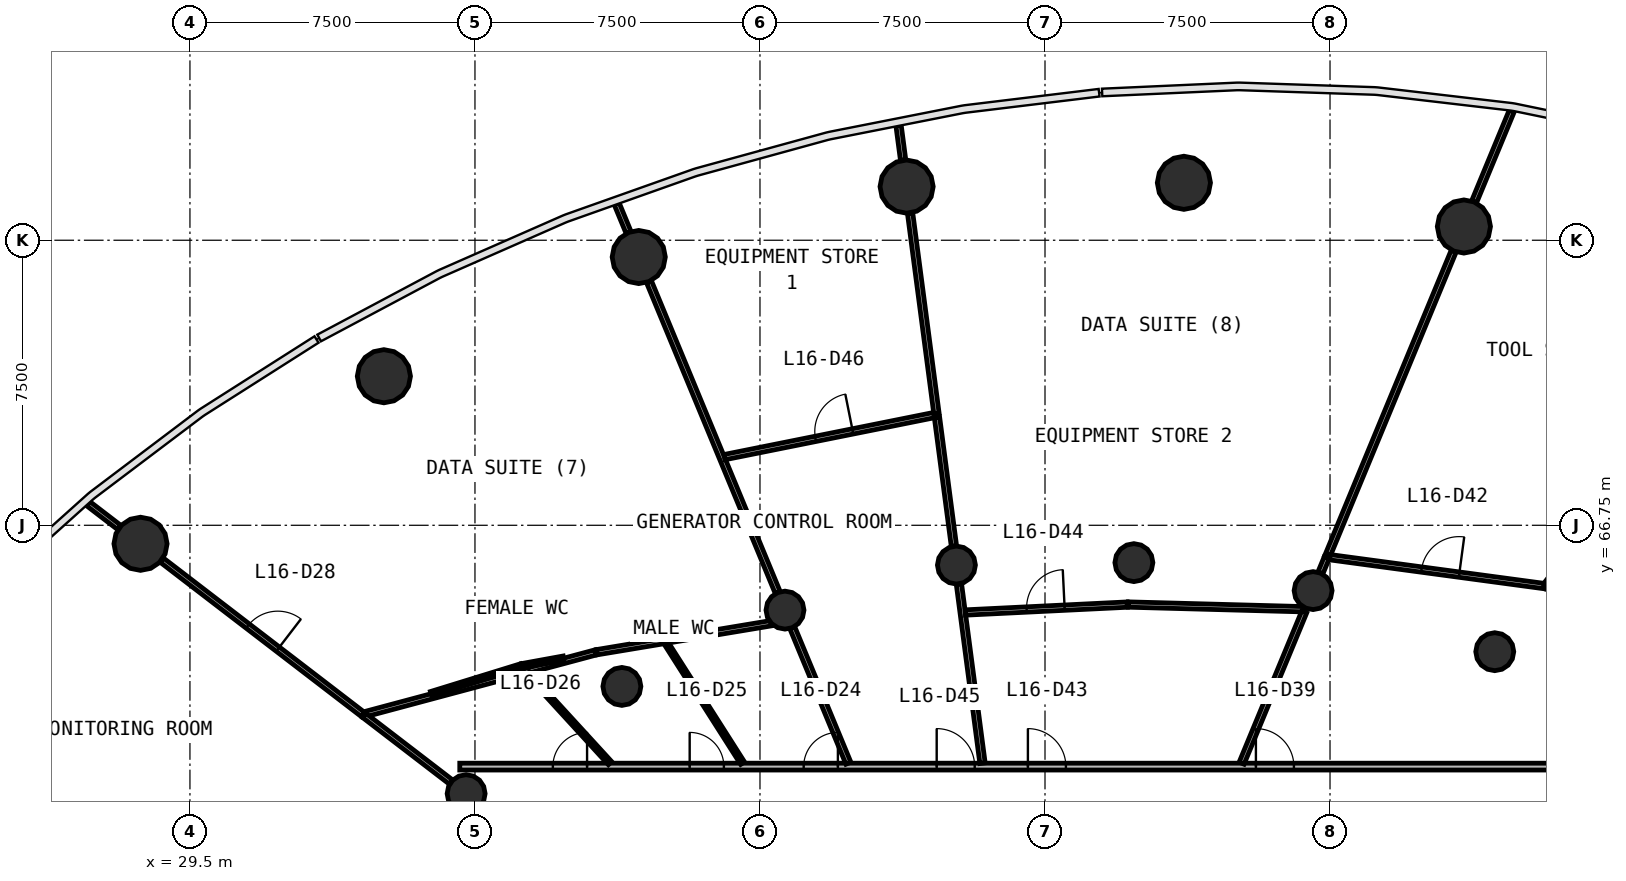
"""IFC4 building model, lengths in metres.
Left out: names, types, materials, properties, quantities, classifications, styles, units other than length and angle.
Written with IfcOpenShell. Run it as: python <this file> out.ifc"""

import sys

from ifc_helpers import new_model, si_unit, direction, frame, frame_2d, origin, origin_2d, place, context, subcontext, project, spatial, rectangle, circle, extrude, source, transform, mapped, element, fill, save


model = new_model("IFC4")
c1 = context("Model", 3, precision=1e-05, world=origin(), true_north=direction((0.0, 1.0)))
c2 = subcontext(c1, "Body", "Model", "MODEL_VIEW")
j1 = project(units=[si_unit("LENGTHUNIT", "METRE"), si_unit("PLANEANGLEUNIT", "RADIAN")], contexts=[c1])
p1 = place(None, origin())
s1 = spatial("IfcSite", under=j1, at=p1, CompositionType="ELEMENT")
p2 = place(p1, origin())
s2 = spatial("IfcBuilding", under=s1, at=p2, CompositionType="ELEMENT")
p3 = place(p2, frame((0.0, 0.0, 71.0)))
s3 = spatial("IfcBuildingStorey", under=s2, at=p3, CompositionType="ELEMENT", Elevation=71.0)
m1 = source(origin(), c2, "Body", "SweptSolid", [
    extrude(circle(Radius=0.7, at=origin_2d()), origin(), (0.0, 0.0, 1.0), 4.4),
])
for number, where, z_axis, x_axis in (
    (1, (63.023, 74.611, 0.0), (0.0, 0.0, 1.0), (1.0, 0.0, 0.0)),
    (2, (55.655, 75.761, 0.0), (0.0, 0.0, 1.0), (1.0, 0.0, 0.0)),
    (3, (48.358, 75.661, 0.0), (0.0, 0.0, 1.0), (1.0, 0.0, 0.0)),
    (4, (41.31, 73.809, 0.0), (0.0, 0.0, 1.0), (1.0, 0.0, 0.0)),
    (5, (34.604, 70.672, 0.0), (0.0, 0.0, 1.0), (1.0, 0.0, 0.0)),
    (6, (28.199, 66.263, 0.0), (0.0, 0.0, 1.0), (1.0, 0.0, 0.0)),
):
    element("IfcColumn", number, at=place(p3, frame(where, z_axis=z_axis, x_axis=x_axis)), inside=s3, PredefinedType="COLUMN", context=c2, shape_type="MappedRepresentation", body=[
        mapped(m1, transform((0.0, 0.0, 0.0), scale=1.0)),
    ])
m2 = source(origin(), c2, "Body", "SweptSolid", [
    extrude(circle(Radius=0.5, at=origin_2d()), origin(), (0.0, 0.0, 1.0), 4.4),
])
for number, where, z_axis, x_axis in (
    (7, (63.835, 63.424, 0.0), (0.0, 0.0, 1.0), (1.0, 0.0, 0.0)),
    (8, (59.055, 65.031, 0.0), (0.0, 0.0, 1.0), (1.0, 0.0, 0.0)),
    (9, (54.339, 65.767, 0.0), (0.0, 0.0, 1.0), (1.0, 0.0, 0.0)),
    (10, (49.669, 65.703, 0.0), (0.0, 0.0, 1.0), (1.0, 0.0, 0.0)),
    (11, (45.158, 64.518, 0.0), (0.0, 0.0, 1.0), (1.0, 0.0, 0.0)),
    (12, (40.866, 62.51, 0.0), (0.0, 0.0, 1.0), (1.0, 0.0, 0.0)),
    (13, (36.768, 59.688, 0.0), (0.0, 0.0, 1.0), (1.0, 0.0, 0.0)),
):
    element("IfcColumn", number, at=place(p3, frame(where, z_axis=z_axis, x_axis=x_axis)), inside=s3, PredefinedType="COLUMN", context=c2, shape_type="MappedRepresentation", body=[
        mapped(m2, transform((0.0, 0.0, 0.0), scale=1.0)),
    ])
p4 = place(p3, frame((36.6, 60.4, 0.0), z_axis=(0.0, 0.0, 1.0), x_axis=(1.0, 0.0, 0.0)))
e14 = element("IfcWall", 14, at=p4, inside=s3, PredefinedType="PARTITIONING", context=c2, shape_type="SweptSolid", body=[
    extrude(rectangle(XDim=30.8, YDim=0.18, at=frame_2d((15.4, 0.0))), origin(), (0.0, 0.0, 1.0), 3.0),
])
p5 = place(p4, frame((9.05, 0.0, 0.0)))
e15 = element("IfcOpeningElement", 15, at=p5, cuts=e14, PredefinedType="OPENING", context=c2, shape_type="SweptSolid", body=[
    extrude(rectangle(XDim=0.9, YDim=2.1, at=frame_2d((0.45, 1.05))), frame((0.0, 0.1, 0.0), z_axis=(0.0, -1.0, 0.0), x_axis=(1.0, 0.0, 0.0)), (0.0, 0.0, 1.0), 0.2),
])
p6 = place(p4, frame((6.05, 0.0, 0.0)))
e16 = element("IfcOpeningElement", 16, at=p6, cuts=e14, PredefinedType="OPENING", context=c2, shape_type="SweptSolid", body=[
    extrude(rectangle(XDim=0.9, YDim=2.1, at=frame_2d((0.45, 1.05))), frame((0.0, 0.1, 0.0), z_axis=(0.0, -1.0, 0.0), x_axis=(1.0, 0.0, 0.0)), (0.0, 0.0, 1.0), 0.2),
])
p7 = place(p4, frame((2.45, 0.0, 0.0)))
e17 = element("IfcOpeningElement", 17, at=p7, cuts=e14, PredefinedType="OPENING", context=c2, shape_type="SweptSolid", body=[
    extrude(rectangle(XDim=0.9, YDim=2.1, at=frame_2d((0.45, 1.05))), frame((0.0, 0.1, 0.0), z_axis=(0.0, -1.0, 0.0), x_axis=(1.0, 0.0, 0.0)), (0.0, 0.0, 1.0), 0.2),
])
p8 = place(p4, frame((20.95, 0.0, 0.0)))
e18 = element("IfcOpeningElement", 18, at=p8, cuts=e14, PredefinedType="OPENING", context=c2, shape_type="SweptSolid", body=[
    extrude(rectangle(XDim=1.0, YDim=2.1, at=frame_2d((0.5, 1.05))), frame((0.0, 0.1, 0.0), z_axis=(0.0, -1.0, 0.0), x_axis=(1.0, 0.0, 0.0)), (0.0, 0.0, 1.0), 0.2),
])
p9 = place(p4, frame((14.95, 0.0, 0.0)))
e19 = element("IfcOpeningElement", 19, at=p9, cuts=e14, PredefinedType="OPENING", context=c2, shape_type="SweptSolid", body=[
    extrude(rectangle(XDim=1.0, YDim=2.1, at=frame_2d((0.5, 1.05))), frame((0.0, 0.1, 0.0), z_axis=(0.0, -1.0, 0.0), x_axis=(1.0, 0.0, 0.0)), (0.0, 0.0, 1.0), 0.2),
])
p10 = place(p4, frame((12.55, 0.0, 0.0)))
e20 = element("IfcOpeningElement", 20, at=p10, cuts=e14, PredefinedType="OPENING", context=c2, shape_type="SweptSolid", body=[
    extrude(rectangle(XDim=1.0, YDim=2.1, at=frame_2d((0.5, 1.05))), frame((0.0, 0.1, 0.0), z_axis=(0.0, -1.0, 0.0), x_axis=(1.0, 0.0, 0.0)), (0.0, 0.0, 1.0), 0.2),
])
p11 = place(p3, frame((32.561, 56.052, 0.0), z_axis=(0.0, 0.0, 1.0), x_axis=(-0.923874685699, 0.382695133396, 0.0)))
e21 = element("IfcWall", 21, at=p11, inside=s3, PredefinedType="PARTITIONING", context=c2, shape_type="SweptSolid", body=[
    extrude(rectangle(XDim=10.341, YDim=0.14, at=frame_2d((5.17, 0.0))), origin(), (0.0, 0.0, 1.0), 3.0),
])
p12 = place(p3, frame((44.965, 64.984, 0.0), z_axis=(0.0, 0.0, 1.0), x_axis=(-0.382692208588, 0.923875897232, 0.0)))
e22 = element("IfcWall", 22, at=p12, inside=s3, PredefinedType="PARTITIONING", context=c2, shape_type="SweptSolid", body=[
    extrude(rectangle(XDim=8.846, YDim=0.14, at=frame_2d((4.423, 0.0))), origin(), (0.0, 0.0, 1.0), 3.0),
])
p13 = place(p3, frame((59.423, 65.92, 0.0), z_axis=(0.0, 0.0, 1.0), x_axis=(0.382676362581, 0.92388246088, 0.0)))
e23 = element("IfcWall", 23, at=p13, inside=s3, PredefinedType="PARTITIONING", context=c2, shape_type="SweptSolid", body=[
    extrude(rectangle(XDim=8.703, YDim=0.14, at=frame_2d((4.351, 0.0))), origin(), (0.0, 0.0, 1.0), 3.0),
])
p14 = place(p3, frame((65.158, 65.147, 0.0), z_axis=(0.0, 0.0, 1.0), x_axis=(0.608766021213, 0.793349816548, 0.0)))
e24 = element("IfcWall", 24, at=p14, inside=s3, PredefinedType="PARTITIONING", context=c2, shape_type="SweptSolid", body=[
    extrude(rectangle(XDim=8.059, YDim=0.14, at=frame_2d((4.029, 0.0))), origin(), (0.0, 0.0, 1.0), 3.0),
])
p15 = place(p3, frame((65.229, 65.126, 0.0), z_axis=(0.0, 0.0, 1.0), x_axis=(0.95810065558, -0.286431726205, 0.0)))
e25 = element("IfcWall", 25, at=p15, inside=s3, PredefinedType="PARTITIONING", context=c2, shape_type="SweptSolid", body=[
    extrude(rectangle(XDim=6.798, YDim=0.14, at=frame_2d((3.399, 0.0))), origin(), (0.0, 0.0, 1.0), 3.0),
])
p16 = place(p15, frame((2.947, 0.0, 0.0)))
e26 = element("IfcOpeningElement", 26, at=p16, cuts=e25, PredefinedType="OPENING", context=c2, shape_type="SweptSolid", body=[
    extrude(rectangle(XDim=1.0, YDim=2.1, at=frame_2d((0.5, 1.05))), frame((0.0, 0.08, 0.0), z_axis=(0.0, -1.0, 0.0), x_axis=(1.0, 0.0, 0.0)), (0.0, 0.0, 1.0), 0.16),
])
p17 = place(p3, frame((28.758, 65.834, 0.0), z_axis=(0.0, 0.0, 1.0), x_axis=(0.793370473237, -0.608739100268, 0.0)))
e27 = element("IfcWall", 27, at=p17, inside=s3, PredefinedType="PARTITIONING", context=c2, shape_type="SweptSolid", body=[
    extrude(rectangle(XDim=6.682, YDim=0.14, at=frame_2d((3.341, 0.0))), origin(), (0.0, 0.0, 1.0), 3.0),
])
p18 = place(p17, frame((2.85, 0.0, 0.0)))
e28 = element("IfcOpeningElement", 28, at=p18, cuts=e27, PredefinedType="OPENING", context=c2, shape_type="SweptSolid", body=[
    extrude(rectangle(XDim=1.0, YDim=2.1, at=frame_2d((0.5, 1.05))), frame((0.0, 0.08, 0.0), z_axis=(0.0, -1.0, 0.0), x_axis=(1.0, 0.0, 0.0)), (0.0, 0.0, 1.0), 0.16),
])
p19 = place(p3, frame((40.179, 63.406, 0.0), z_axis=(0.0, 0.0, 1.0), x_axis=(-0.965952889726, -0.258718021851, 0.0)))
e29 = element("IfcWall", 29, at=p19, inside=s3, PredefinedType="PARTITIONING", context=c2, shape_type="SweptSolid", body=[
    extrude(rectangle(XDim=6.305, YDim=0.14, at=frame_2d((3.153, 0.0))), origin(), (0.0, 0.0, 1.0), 3.0),
])
p20 = place(p3, frame((59.494, 65.91, 0.0), z_axis=(0.0, 0.0, 1.0), x_axis=(0.991057166824, -0.133437970936, 0.0)))
e30 = element("IfcWall", 30, at=p20, inside=s3, PredefinedType="PARTITIONING", context=c2, shape_type="SweptSolid", body=[
    extrude(rectangle(XDim=5.685, YDim=0.14, at=frame_2d((2.842, 0.0))), origin(), (0.0, 0.0, 1.0), 3.0),
])
p21 = place(p20, frame((2.435, 0.0, 0.0)))
e31 = element("IfcOpeningElement", 31, at=p21, cuts=e30, PredefinedType="OPENING", context=c2, shape_type="SweptSolid", body=[
    extrude(rectangle(XDim=1.0, YDim=2.1, at=frame_2d((0.5, 1.05))), frame((0.0, 0.08, 0.0), z_axis=(0.0, -1.0, 0.0), x_axis=(1.0, 0.0, 0.0)), (0.0, 0.0, 1.0), 0.16),
])
p22 = place(p3, frame((43.566, 68.543, 0.0), z_axis=(0.0, 0.0, 1.0), x_axis=(0.980468350945, 0.196676924916, 0.0)))
e32 = element("IfcWall", 32, at=p22, inside=s3, PredefinedType="PARTITIONING", context=c2, shape_type="SweptSolid", body=[
    extrude(rectangle(XDim=5.693, YDim=0.14, at=frame_2d((2.846, 0.0))), origin(), (0.0, 0.0, 1.0), 3.0),
])
p23 = place(p22, frame((2.443, 0.0, 0.0)))
e33 = element("IfcOpeningElement", 33, at=p23, cuts=e32, PredefinedType="OPENING", context=c2, shape_type="SweptSolid", body=[
    extrude(rectangle(XDim=1.0, YDim=2.1, at=frame_2d((0.5, 1.05))), frame((0.0, 0.08, 0.0), z_axis=(0.0, -1.0, 0.0), x_axis=(1.0, 0.0, 0.0)), (0.0, 0.0, 1.0), 0.16),
])
p24 = place(p3, frame((49.144, 69.692, 0.0), z_axis=(0.0, 0.0, 1.0), x_axis=(-0.130515097822, 0.991446321916, 0.0)))
e34 = element("IfcWall", 34, at=p24, inside=s3, PredefinedType="PARTITIONING", context=c2, shape_type="SweptSolid", body=[
    extrude(rectangle(XDim=5.316, YDim=0.14, at=frame_2d((2.658, 0.0))), origin(), (0.0, 0.0, 1.0), 3.0),
])
p25 = place(p3, frame((49.735, 65.203, 0.0), z_axis=(0.0, 0.0, 1.0), x_axis=(0.130548834981, -0.991441880135, 0.0)))
e35 = element("IfcWall", 35, at=p25, inside=s3, PredefinedType="PARTITIONING", context=c2, shape_type="SweptSolid", body=[
    extrude(rectangle(XDim=4.754, YDim=0.14, at=frame_2d((2.377, 0.0))), origin(), (0.0, 0.0, 1.0), 3.0),
])
p26 = place(p3, frame((44.79, 64.173, 0.0), z_axis=(0.0, 0.0, 1.0), x_axis=(-0.986452107545, -0.164049503258, 0.0)))
e36 = element("IfcWall", 36, at=p26, inside=s3, PredefinedType="PARTITIONING", context=c2, shape_type="SweptSolid", body=[
    extrude(rectangle(XDim=4.645, YDim=0.14, at=frame_2d((2.322, 0.0))), origin(), (0.0, 0.0, 1.0), 3.0),
])
p27 = place(p3, frame((58.851, 64.54, 0.0), z_axis=(0.0, 0.0, 1.0), x_axis=(-0.999641405582, 0.026777980617, 0.0)))
e37 = element("IfcWall", 37, at=p27, inside=s3, PredefinedType="PARTITIONING", context=c2, shape_type="SweptSolid", body=[
    extrude(rectangle(XDim=4.659, YDim=0.14, at=frame_2d((2.33, 0.0))), origin(), (0.0, 0.0, 1.0), 3.0),
])
p28 = place(p3, frame((57.174, 60.49, 0.0), z_axis=(0.0, 0.0, 1.0), x_axis=(0.382647054989, 0.923894599675, 0.0)))
e38 = element("IfcWall", 38, at=p28, inside=s3, PredefinedType="PARTITIONING", context=c2, shape_type="SweptSolid", body=[
    extrude(rectangle(XDim=4.309, YDim=0.14, at=frame_2d((2.154, 0.0))), origin(), (0.0, 0.0, 1.0), 3.0),
])
p29 = place(p3, frame((49.904, 64.455, 0.0), z_axis=(0.0, 0.0, 1.0), x_axis=(0.998809903791, 0.048772698191, 0.0)))
e39 = element("IfcWall", 39, at=p29, inside=s3, PredefinedType="PARTITIONING", context=c2, shape_type="SweptSolid", body=[
    extrude(rectangle(XDim=4.265, YDim=0.14, at=frame_2d((2.132, 0.0))), origin(), (0.0, 0.0, 1.0), 3.0),
])
p30 = place(p29, frame((1.615, 0.0, 0.0)))
e40 = element("IfcOpeningElement", 40, at=p30, cuts=e39, PredefinedType="OPENING", context=c2, shape_type="SweptSolid", body=[
    extrude(rectangle(XDim=1.0, YDim=2.1, at=frame_2d((0.5, 1.05))), frame((0.0, 0.08, 0.0), z_axis=(0.0, -1.0, 0.0), x_axis=(1.0, 0.0, 0.0)), (0.0, 0.0, 1.0), 0.16),
])
p31 = place(p3, frame((46.826, 60.49, 0.0), z_axis=(0.0, 0.0, 1.0), x_axis=(-0.382644558062, 0.923895633817, 0.0)))
e41 = element("IfcWall", 41, at=p31, inside=s3, PredefinedType="PARTITIONING", context=c2, shape_type="SweptSolid", body=[
    extrude(rectangle(XDim=3.854, YDim=0.14, at=frame_2d((1.927, 0.0))), origin(), (0.0, 0.0, 1.0), 3.0),
])
p32 = place(p3, frame((49.604, 66.203, 0.0), z_axis=(0.0, 0.0, 1.0), x_axis=(-0.130526548141, 0.991444814516, 0.0)))
e42 = element("IfcWall", 42, at=p32, inside=s3, PredefinedType="PARTITIONING", context=c2, shape_type="SweptSolid", body=[
    extrude(rectangle(XDim=3.419, YDim=0.14, at=frame_2d((1.709, 0.0))), origin(), (0.0, 0.0, 1.0), 3.0),
])
p33 = place(p3, frame((36.367, 59.995, 0.0), z_axis=(0.0, 0.0, 1.0), x_axis=(-0.793375175499, 0.608732971755, 0.0)))
e43 = element("IfcWall", 43, at=p33, inside=s3, PredefinedType="PARTITIONING", context=c2, shape_type="SweptSolid", body=[
    extrude(rectangle(XDim=2.873, YDim=0.14, at=frame_2d((1.437, 0.0))), origin(), (0.0, 0.0, 1.0), 3.0),
])
p34 = place(p3, frame((63.292, 75.263, 0.0), z_axis=(0.0, 0.0, 1.0), x_axis=(0.382735718693, 0.923857873072, 0.0)))
e44 = element("IfcWall", 44, at=p34, inside=s3, PredefinedType="PARTITIONING", context=c2, shape_type="SweptSolid", body=[
    extrude(rectangle(XDim=2.583, YDim=0.14, at=frame_2d((1.292, 0.0))), origin(), (0.0, 0.0, 1.0), 3.0),
])
p35 = place(p3, frame((27.641, 66.691, 0.0), z_axis=(0.0, 0.0, 1.0), x_axis=(-0.793207707095, 0.608951174895, 0.0)))
e45 = element("IfcWall", 45, at=p35, inside=s3, PredefinedType="PARTITIONING", context=c2, shape_type="SweptSolid", body=[
    extrude(rectangle(XDim=1.026, YDim=0.14, at=frame_2d((0.513, 0.0))), origin(), (0.0, 0.0, 1.0), 3.0),
])
p36 = place(p3, frame((48.266, 76.36, 0.0), z_axis=(0.0, 0.0, 1.0), x_axis=(-0.130495264695, 0.991448932569, 0.0)))
e46 = element("IfcWall", 46, at=p36, inside=s3, PredefinedType="PARTITIONING", context=c2, shape_type="SweptSolid", body=[
    extrude(rectangle(XDim=0.93, YDim=0.14, at=frame_2d((0.465, 0.0))), origin(), (0.0, 0.0, 1.0), 3.0),
])
p37 = place(p3, frame((41.04, 74.46, 0.0), z_axis=(0.0, 0.0, 1.0), x_axis=(-0.382641988431, 0.923896698062, 0.0)))
e47 = element("IfcWall", 47, at=p37, inside=s3, PredefinedType="PARTITIONING", context=c2, shape_type="SweptSolid", body=[
    extrude(rectangle(XDim=0.817, YDim=0.14, at=frame_2d((0.409, 0.0))), origin(), (0.0, 0.0, 1.0), 3.0),
])
p38 = place(p3, frame((59.248, 65.498, 0.0), z_axis=(0.0, 0.0, 1.0), x_axis=(0.382705452121, 0.923870411322, 0.0)))
e48 = element("IfcWall", 48, at=p38, inside=s3, PredefinedType="PARTITIONING", context=c2, shape_type="SweptSolid", body=[
    extrude(rectangle(XDim=0.427, YDim=0.14, at=frame_2d((0.213, 0.0))), origin(), (0.0, 0.0, 1.0), 3.0),
])
p39 = place(p3, frame((38.212, 63.047, 0.0), z_axis=(0.0, 0.0, 1.0), x_axis=(-0.955599721478, -0.294667901731, 0.0)))
e49 = element("IfcWall", 49, at=p39, inside=s3, PredefinedType="PARTITIONING", context=c2, shape_type="SweptSolid", body=[
    extrude(rectangle(XDim=2.476, YDim=0.12, at=frame_2d((1.238, 0.0))), origin(), (0.0, 0.0, 1.0), 3.0),
])
p40 = place(p3, frame((44.043, 60.49, 0.0), z_axis=(0.0, 0.0, 1.0), x_axis=(-0.53728105283, 0.843403266694, 0.0)))
e50 = element("IfcWall", 50, at=p40, inside=s3, PredefinedType="PARTITIONING", context=c2, shape_type="SweptSolid", body=[
    extrude(rectangle(XDim=3.739, YDim=0.12, at=frame_2d((1.869, 0.0))), origin(), (0.0, 0.0, 1.0), 3.0),
])
p41 = place(p3, frame((40.555, 60.49, 0.0), z_axis=(0.0, 0.0, 1.0), x_axis=(-0.675593584158, 0.737274242765, 0.0)))
e51 = element("IfcWall", 51, at=p41, inside=s3, PredefinedType="PARTITIONING", context=c2, shape_type="SweptSolid", body=[
    extrude(rectangle(XDim=3.206, YDim=0.12, at=frame_2d((1.603, 0.0))), origin(), (0.0, 0.0, 1.0), 3.0),
])
p42 = place(p3, frame((39.332, 63.251, 0.0), z_axis=(0.0, 0.0, 1.0), x_axis=(-0.983774673589, -0.179408449088, 0.0)))
e52 = element("IfcWall", 52, at=p42, inside=s3, PredefinedType="PARTITIONING", context=c2, shape_type="SweptSolid", body=[
    extrude(rectangle(XDim=1.109, YDim=0.12, at=frame_2d((0.555, 0.0))), origin(), (0.0, 0.0, 1.0), 3.0),
])
m3 = source(origin(), c2, "Body", "SweptSolid", [
    extrude(rectangle(XDim=0.9, YDim=2.1, at=frame_2d((0.45, 1.05))), frame((0.0, 0.025, 0.0), z_axis=(0.0, -1.0, 0.0), x_axis=(1.0, 0.0, 0.0)), (0.0, 0.0, 1.0), 0.05),
])
p43 = place(p5, origin())
e53 = element("IfcDoor", 53, at=p43, inside=s3, OperationType="SINGLE_SWING_RIGHT", PredefinedType="DOOR", context=c2, shape_type="MappedRepresentation", body=[
    mapped(m3, transform((0.0, 0.0, 0.0), scale=1.0)),
])
fill(e15, e53)
p44 = place(p6, origin())
e54 = element("IfcDoor", 54, at=p44, inside=s3, OperationType="SINGLE_SWING_LEFT", PredefinedType="DOOR", context=c2, shape_type="MappedRepresentation", body=[
    mapped(m3, transform((0.0, 0.0, 0.0), scale=1.0)),
])
fill(e16, e54)
p45 = place(p7, origin())
e55 = element("IfcDoor", 55, at=p45, inside=s3, OperationType="SINGLE_SWING_RIGHT", PredefinedType="DOOR", context=c2, shape_type="MappedRepresentation", body=[
    mapped(m3, transform((0.0, 0.0, 0.0), scale=1.0)),
])
fill(e17, e55)
m4 = source(origin(), c2, "Body", "SweptSolid", [
    extrude(rectangle(XDim=1.0, YDim=2.1, at=frame_2d((0.5, 1.05))), frame((0.0, 0.025, 0.0), z_axis=(0.0, -1.0, 0.0), x_axis=(1.0, 0.0, 0.0)), (0.0, 0.0, 1.0), 0.05),
])
p46 = place(p18, origin())
e56 = element("IfcDoor", 56, at=p46, inside=s3, OperationType="SINGLE_SWING_RIGHT", PredefinedType="DOOR", context=c2, shape_type="MappedRepresentation", body=[
    mapped(m4, transform((0.0, 0.0, 0.0), scale=1.0)),
])
fill(e28, e56)
p47 = place(p8, origin())
e57 = element("IfcDoor", 57, at=p47, inside=s3, OperationType="SINGLE_SWING_LEFT", PredefinedType="DOOR", context=c2, shape_type="MappedRepresentation", body=[
    mapped(m4, transform((0.0, 0.0, 0.0), scale=1.0)),
])
fill(e18, e57)
p48 = place(p21, origin())
e58 = element("IfcDoor", 58, at=p48, inside=s3, OperationType="SINGLE_SWING_RIGHT", PredefinedType="DOOR", context=c2, shape_type="MappedRepresentation", body=[
    mapped(m4, transform((0.0, 0.0, 0.0), scale=1.0)),
])
fill(e31, e58)
p49 = place(p9, origin())
e59 = element("IfcDoor", 59, at=p49, inside=s3, OperationType="SINGLE_SWING_LEFT", PredefinedType="DOOR", context=c2, shape_type="MappedRepresentation", body=[
    mapped(m4, transform((0.0, 0.0, 0.0), scale=1.0)),
])
fill(e19, e59)
p50 = place(p30, origin())
e60 = element("IfcDoor", 60, at=p50, inside=s3, OperationType="SINGLE_SWING_RIGHT", PredefinedType="DOOR", context=c2, shape_type="MappedRepresentation", body=[
    mapped(m4, transform((0.0, 0.0, 0.0), scale=1.0)),
])
fill(e40, e60)
p51 = place(p10, origin())
e61 = element("IfcDoor", 61, at=p51, inside=s3, OperationType="SINGLE_SWING_LEFT", PredefinedType="DOOR", context=c2, shape_type="MappedRepresentation", body=[
    mapped(m4, transform((0.0, 0.0, 0.0), scale=1.0)),
])
fill(e20, e61)
p52 = place(p23, origin())
e62 = element("IfcDoor", 62, at=p52, inside=s3, OperationType="SINGLE_SWING_RIGHT", PredefinedType="DOOR", context=c2, shape_type="MappedRepresentation", body=[
    mapped(m4, transform((0.0, 0.0, 0.0), scale=1.0)),
])
fill(e33, e62)
save(model, sys.argv[1])
